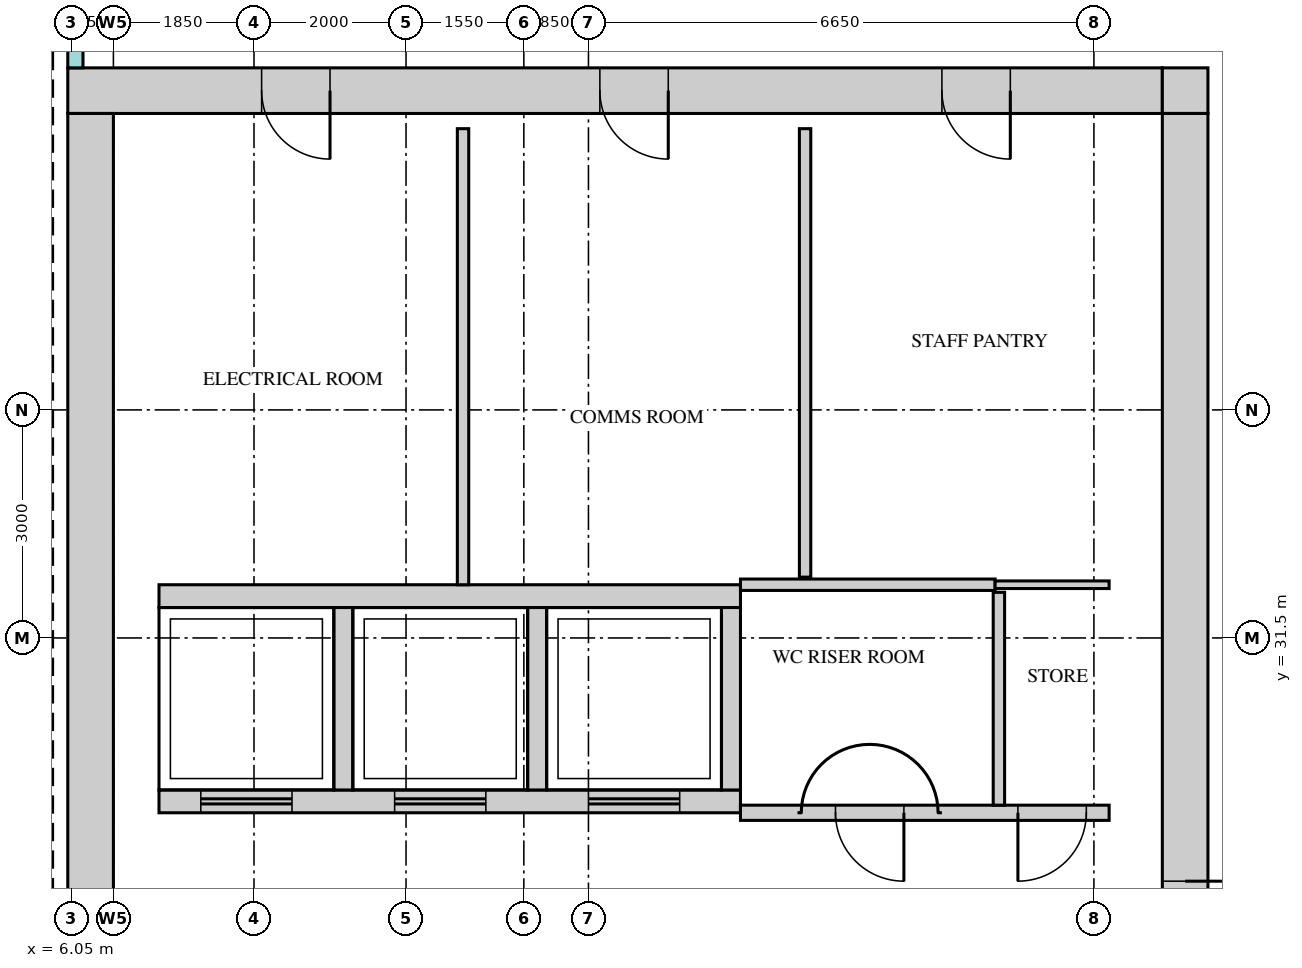
"""IFC4 building model, lengths in metres.
Left out: names, types, materials, properties, quantities, classifications, styles, units other than length and angle.
Written with IfcOpenShell. Run it as: python <this file> out.ifc"""

import sys

from ifc_helpers import new_model, si_unit, direction, frame, frame_2d, origin, place, context, subcontext, project, spatial, rectangle, extrude, source, transform, mapped, element, fill, save


model = new_model("IFC4")
c1 = context("Model", 3, precision=1e-05, world=origin(), true_north=direction((0.0, 1.0)))
c2 = subcontext(c1, "Body", "Model", "MODEL_VIEW")
j1 = project(units=[si_unit("LENGTHUNIT", "METRE"), si_unit("PLANEANGLEUNIT", "RADIAN")], contexts=[c1])
p1 = place(None, origin())
s1 = spatial("IfcSite", under=j1, at=p1, CompositionType="ELEMENT")
p2 = place(p1, origin())
s2 = spatial("IfcBuilding", under=s1, at=p2, CompositionType="ELEMENT")
p3 = place(p2, frame((0.0, 0.0, 290.2)))
s3 = spatial("IfcBuildingStorey", under=s2, at=p3, CompositionType="ELEMENT", Elevation=290.2)
m1 = source(origin(), c2, "Body", "SweptSolid", [
    extrude(rectangle(XDim=14.4, YDim=0.6, at=frame_2d((7.2, 0.0))), origin(), (0.0, 0.0, 1.0), 3.75),
])
p4 = place(p3, frame((6.0, 38.7, 0.0), z_axis=(0.0, 0.0, 1.0), x_axis=(1.0, 0.0, 0.0)))
e1 = element("IfcWall", 1, at=p4, inside=s3, PredefinedType="SHEAR", context=c2, shape_type="MappedRepresentation", body=[
    mapped(m1, transform((0.0, 0.0, 0.0))),
])
m2 = source(origin(), c2, "Body", "SweptSolid", [
    extrude(rectangle(XDim=0.9, YDim=2.1, at=frame_2d((0.45, 1.05))), frame((0.0, 0.31, 0.0), z_axis=(0.0, -1.0, 0.0), x_axis=(1.0, 0.0, 0.0)), (0.0, 0.0, 1.0), 0.62),
])
p5 = place(p4, frame((2.55, 0.0, 0.0)))
e2 = element("IfcOpeningElement", 2, at=p5, cuts=e1, PredefinedType="OPENING", context=c2, shape_type="MappedRepresentation", body=[
    mapped(m2, transform((0.0, 0.0, 0.0))),
])
p6 = place(p4, frame((7.0, 0.0, 0.0)))
e3 = element("IfcOpeningElement", 3, at=p6, cuts=e1, PredefinedType="OPENING", context=c2, shape_type="MappedRepresentation", body=[
    mapped(m2, transform((0.0, 0.0, 0.0))),
])
p7 = place(p4, frame((11.5, 0.0, 0.0)))
e4 = element("IfcOpeningElement", 4, at=p7, cuts=e1, PredefinedType="OPENING", context=c2, shape_type="MappedRepresentation", body=[
    mapped(m2, transform((0.0, 0.0, 0.0))),
])
m3 = source(origin(), c2, "Body", "SweptSolid", [
    extrude(rectangle(XDim=0.6, YDim=0.6, at=frame_2d((0.3, 0.0))), origin(), (0.0, 0.0, 1.0), 3.75),
])
p8 = place(p3, frame((20.4, 38.7, 0.0), z_axis=(0.0, 0.0, 1.0), x_axis=(1.0, 0.0, 0.0)))
e5 = element("IfcWall", 5, at=p8, inside=s3, PredefinedType="SHEAR", context=c2, shape_type="MappedRepresentation", body=[
    mapped(m3, transform((0.0, 0.0, 0.0))),
])
m4 = source(origin(), c2, "Body", "SweptSolid", [
    extrude(rectangle(XDim=22.8, YDim=0.6, at=frame_2d((11.4, 0.0))), origin(), (0.0, 0.0, 1.0), 3.75),
])
p9 = place(p3, frame((20.7, 15.6, 0.0), z_axis=(0.0, 0.0, 1.0), x_axis=(0.0, 1.0, 0.0)))
e6 = element("IfcWall", 6, at=p9, inside=s3, PredefinedType="SHEAR", context=c2, shape_type="MappedRepresentation", body=[
    mapped(m4, transform((0.0, 0.0, 0.0))),
])
m5 = source(origin(), c2, "Body", "SweptSolid", [
    extrude(rectangle(XDim=1.8, YDim=2.1, at=frame_2d((0.9, 1.05))), frame((0.0, 0.31, 0.0), z_axis=(0.0, -1.0, 0.0), x_axis=(1.0, 0.0, 0.0)), (0.0, 0.0, 1.0), 0.62),
])
p10 = place(p9, frame((10.9, 0.0, 0.0)))
e7 = element("IfcOpeningElement", 7, at=p10, cuts=e6, PredefinedType="OPENING", context=c2, shape_type="MappedRepresentation", body=[
    mapped(m5, transform((0.0, 0.0, 0.0))),
])
p11 = place(p9, frame((0.55, 0.0, 0.0)))
e8 = element("IfcOpeningElement", 8, at=p11, cuts=e6, PredefinedType="OPENING", context=c2, shape_type="MappedRepresentation", body=[
    mapped(m2, transform((0.0, 0.0, 0.0))),
])
m6 = source(origin(), c2, "Body", "SweptSolid", [
    extrude(rectangle(XDim=1.0, YDim=2.1, at=frame_2d((0.5, 1.05))), frame((0.0, 0.31, 0.0), z_axis=(0.0, -1.0, 0.0), x_axis=(1.0, 0.0, 0.0)), (0.0, 0.0, 1.0), 0.62),
])
p12 = place(p9, frame((2.3, 0.0, 0.0)))
e9 = element("IfcOpeningElement", 9, at=p12, cuts=e6, PredefinedType="OPENING", context=c2, shape_type="MappedRepresentation", body=[
    mapped(m6, transform((0.0, 0.0, 0.0))),
])
p13 = place(p9, frame((5.1, 0.0, 0.0)))
e10 = element("IfcOpeningElement", 10, at=p13, cuts=e6, PredefinedType="OPENING", context=c2, shape_type="MappedRepresentation", body=[
    mapped(m2, transform((0.0, 0.0, 0.0))),
])
p14 = place(p3, frame((6.3, 15.6, 0.0), z_axis=(0.0, 0.0, 1.0), x_axis=(0.0, 1.0, 0.0)))
e11 = element("IfcWall", 11, at=p14, inside=s3, PredefinedType="SHEAR", context=c2, shape_type="MappedRepresentation", body=[
    mapped(m4, transform((0.0, 0.0, 0.0))),
])
m7 = source(origin(), c2, "Body", "SweptSolid", [
    extrude(rectangle(XDim=7.65, YDim=0.3, at=frame_2d((3.825, 0.0))), origin(), (0.0, 0.0, 1.0), 3.75),
])
p15 = place(p3, frame((7.2, 32.05, 0.0), z_axis=(0.0, 0.0, 1.0), x_axis=(1.0, 0.0, 0.0)))
e12 = element("IfcWall", 12, at=p15, inside=s3, PredefinedType="STANDARD", context=c2, shape_type="MappedRepresentation", body=[
    mapped(m7, transform((0.0, 0.0, 0.0))),
])
p16 = place(p3, frame((7.2, 29.35, 0.0), z_axis=(0.0, 0.0, 1.0), x_axis=(1.0, 0.0, 0.0)))
e13 = element("IfcWall", 13, at=p16, inside=s3, PredefinedType="STANDARD", context=c2, shape_type="MappedRepresentation", body=[
    mapped(m7, transform((0.0, 0.0, 0.0))),
])
m8 = source(origin(), c2, "Body", "SweptSolid", [
    extrude(rectangle(XDim=1.2, YDim=2.1, at=frame_2d((0.6, 1.05))), frame((0.0, 0.16, 0.0), z_axis=(0.0, -1.0, 0.0), x_axis=(1.0, 0.0, 0.0)), (0.0, 0.0, 1.0), 0.32),
])
p17 = place(p16, frame((0.55, 0.0, 0.0)))
e14 = element("IfcOpeningElement", 14, at=p17, cuts=e13, PredefinedType="OPENING", context=c2, shape_type="MappedRepresentation", body=[
    mapped(m8, transform((0.0, 0.0, 0.0))),
])
p18 = place(p16, frame((3.1, 0.0, 0.0)))
e15 = element("IfcOpeningElement", 15, at=p18, cuts=e13, PredefinedType="OPENING", context=c2, shape_type="MappedRepresentation", body=[
    mapped(m8, transform((0.0, 0.0, 0.0))),
])
p19 = place(p16, frame((5.65, 0.0, 0.0)))
e16 = element("IfcOpeningElement", 16, at=p19, cuts=e13, PredefinedType="OPENING", context=c2, shape_type="MappedRepresentation", body=[
    mapped(m8, transform((0.0, 0.0, 0.0))),
])
m9 = source(origin(), c2, "Body", "SweptSolid", [
    extrude(rectangle(XDim=2.4, YDim=0.25, at=frame_2d((1.2, 0.0))), origin(), (0.0, 0.0, 1.0), 3.75),
])
for number, where, z_axis, x_axis in (
    (17, (9.625, 29.5, 0.0), (0.0, 0.0, 1.0), (0.0, 1.0, 0.0)),
    (18, (12.175, 29.5, 0.0), (0.0, 0.0, 1.0), (0.0, 1.0, 0.0)),
    (19, (14.725, 29.5, 0.0), (0.0, 0.0, 1.0), (0.0, 1.0, 0.0)),
):
    element("IfcWall", number, at=place(p3, frame(where, z_axis=z_axis, x_axis=x_axis)), inside=s3, PredefinedType="STANDARD", context=c2, shape_type="MappedRepresentation", body=[
        mapped(m9, transform((0.0, 0.0, 0.0))),
    ])
m10 = source(origin(), c2, "Body", "SweptSolid", [
    extrude(rectangle(XDim=4.85, YDim=0.2, at=frame_2d((2.425, 0.0))), origin(), (0.0, 0.0, 1.0), 3.8),
])
p20 = place(p3, frame((14.85, 29.2, 0.0), z_axis=(0.0, 0.0, 1.0), x_axis=(1.0, 0.0, 0.0)))
e20 = element("IfcWall", 20, at=p20, inside=s3, PredefinedType="PARTITIONING", context=c2, shape_type="MappedRepresentation", body=[
    mapped(m10, transform((0.0, 0.0, 0.0))),
])
m11 = source(origin(), c2, "Body", "SweptSolid", [
    extrude(rectangle(XDim=0.9, YDim=2.1, at=frame_2d((0.45, 1.05))), frame((0.0, 0.11, 0.0), z_axis=(0.0, -1.0, 0.0), x_axis=(1.0, 0.0, 0.0)), (0.0, 0.0, 1.0), 0.22),
])
p21 = place(p20, frame((1.25, 0.0, 0.0)))
e21 = element("IfcOpeningElement", 21, at=p21, cuts=e20, PredefinedType="OPENING", context=c2, shape_type="MappedRepresentation", body=[
    mapped(m11, transform((0.0, 0.0, 0.0))),
])
p22 = place(p20, frame((3.65, 0.0, 0.0)))
e22 = element("IfcOpeningElement", 22, at=p22, cuts=e20, PredefinedType="OPENING", context=c2, shape_type="MappedRepresentation", body=[
    mapped(m11, transform((0.0, 0.0, 0.0))),
])
m12 = source(origin(), c2, "Body", "SweptSolid", [
    extrude(rectangle(XDim=2.8, YDim=0.15, at=frame_2d((1.4, 0.0))), origin(), (0.0, 0.0, 1.0), 3.8),
])
p23 = place(p3, frame((18.25, 29.3, 0.0), z_axis=(0.0, 0.0, 1.0), x_axis=(0.0, 1.0, 0.0)))
e23 = element("IfcWall", 23, at=p23, inside=s3, PredefinedType="PARTITIONING", context=c2, shape_type="MappedRepresentation", body=[
    mapped(m12, transform((0.0, 0.0, 0.0))),
])
m13 = source(origin(), c2, "Body", "SweptSolid", [
    extrude(rectangle(XDim=6.0, YDim=0.15, at=frame_2d((3.0, 0.0))), origin(), (0.0, 0.0, 1.0), 3.8),
])
p24 = place(p3, frame((11.2, 32.2, 0.0), z_axis=(0.0, 0.0, 1.0), x_axis=(0.0, 1.0, 0.0)))
e24 = element("IfcWall", 24, at=p24, inside=s3, PredefinedType="PARTITIONING", context=c2, shape_type="MappedRepresentation", body=[
    mapped(m13, transform((0.0, 0.0, 0.0))),
])
m14 = source(origin(), c2, "Body", "SweptSolid", [
    extrude(rectangle(XDim=3.35, YDim=0.15, at=frame_2d((1.675, 0.0))), origin(), (0.0, 0.0, 1.0), 3.8),
])
p25 = place(p3, frame((14.85, 32.2, 0.0), z_axis=(0.0, 0.0, 1.0), x_axis=(1.0, 0.0, 0.0)))
e25 = element("IfcWall", 25, at=p25, inside=s3, PredefinedType="PARTITIONING", context=c2, shape_type="MappedRepresentation", body=[
    mapped(m14, transform((0.0, 0.0, 0.0))),
])
m15 = source(origin(), c2, "Body", "SweptSolid", [
    extrude(rectangle(XDim=1.5, YDim=0.1, at=frame_2d((0.75, 0.0))), origin(), (0.0, 0.0, 1.0), 3.8),
])
p26 = place(p3, frame((18.2, 32.2, 0.0), z_axis=(0.0, 0.0, 1.0), x_axis=(1.0, 0.0, 0.0)))
e26 = element("IfcWall", 26, at=p26, inside=s3, PredefinedType="PARTITIONING", context=c2, shape_type="MappedRepresentation", body=[
    mapped(m15, transform((0.0, 0.0, 0.0))),
])
m16 = source(origin(), c2, "Body", "SweptSolid", [
    extrude(rectangle(XDim=5.9, YDim=0.15, at=frame_2d((2.95, 0.0))), origin(), (0.0, 0.0, 1.0), 3.8),
])
p27 = place(p3, frame((15.7, 32.3, 0.0), z_axis=(0.0, 0.0, 1.0), x_axis=(0.0, 1.0, 0.0)))
e27 = element("IfcWall", 27, at=p27, inside=s3, PredefinedType="PARTITIONING", context=c2, shape_type="MappedRepresentation", body=[
    mapped(m16, transform((0.0, 0.0, 0.0))),
])
m17 = source(origin(), c2, "Body", "SweptSolid", [
    extrude(rectangle(XDim=0.9, YDim=2.1, at=frame_2d((0.45, 1.05))), frame((0.0, 0.025, 0.0), z_axis=(0.0, -1.0, 0.0), x_axis=(1.0, 0.0, 0.0)), (0.0, 0.0, 1.0), 0.05),
])
p28 = place(p21, origin())
e28 = element("IfcDoor", 28, at=p28, inside=s3, OperationType="SINGLE_SWING_RIGHT", PredefinedType="DOOR", context=c2, shape_type="MappedRepresentation", body=[
    mapped(m17, transform((0.0, 0.0, 0.0))),
])
fill(e21, e28)
p29 = place(p22, origin())
e29 = element("IfcDoor", 29, at=p29, inside=s3, OperationType="SINGLE_SWING_LEFT", PredefinedType="DOOR", context=c2, shape_type="MappedRepresentation", body=[
    mapped(m17, transform((0.0, 0.0, 0.0))),
])
fill(e22, e29)
m18 = source(origin(), c2, "Body", "SweptSolid", [
    extrude(rectangle(XDim=1.8, YDim=2.1, at=frame_2d((0.9, 1.05))), frame((0.0, 0.25, 0.0), z_axis=(0.0, -1.0, 0.0), x_axis=(1.0, 0.0, 0.0)), (0.0, 0.0, 1.0), 0.5),
])
p30 = place(p10, origin())
e30 = element("IfcDoor", 30, at=p30, inside=s3, OperationType="DOUBLE_DOOR_SINGLE_SWING", PredefinedType="DOOR", context=c2, shape_type="MappedRepresentation", body=[
    mapped(m18, transform((0.0, 0.0, 0.0))),
])
fill(e7, e30)
m19 = source(origin(), c2, "Body", "SweptSolid", [
    extrude(rectangle(XDim=0.9, YDim=2.1, at=frame_2d((0.45, 1.05))), frame((0.0, 0.25, 0.0), z_axis=(0.0, -1.0, 0.0), x_axis=(1.0, 0.0, 0.0)), (0.0, 0.0, 1.0), 0.5),
])
p31 = place(p5, origin())
e31 = element("IfcDoor", 31, at=p31, inside=s3, OperationType="SINGLE_SWING_RIGHT", PredefinedType="DOOR", context=c2, shape_type="MappedRepresentation", body=[
    mapped(m19, transform((0.0, 0.0, 0.0))),
])
fill(e2, e31)
p32 = place(p6, origin())
e32 = element("IfcDoor", 32, at=p32, inside=s3, OperationType="SINGLE_SWING_RIGHT", PredefinedType="DOOR", context=c2, shape_type="MappedRepresentation", body=[
    mapped(m19, transform((0.0, 0.0, 0.0))),
])
fill(e3, e32)
p33 = place(p7, origin())
e33 = element("IfcDoor", 33, at=p33, inside=s3, OperationType="SINGLE_SWING_RIGHT", PredefinedType="DOOR", context=c2, shape_type="MappedRepresentation", body=[
    mapped(m19, transform((0.0, 0.0, 0.0))),
])
fill(e4, e33)
m20 = source(origin(), c2, "Body", "SweptSolid", [
    extrude(rectangle(XDim=1.2, YDim=2.1, at=frame_2d((0.6, 1.05))), frame((0.0, 0.025, 0.0), z_axis=(0.0, -1.0, 0.0), x_axis=(1.0, 0.0, 0.0)), (0.0, 0.0, 1.0), 0.05),
])
p34 = place(p17, origin())
e34 = element("IfcDoor", 34, at=p34, inside=s3, OperationType="DOUBLE_DOOR_SLIDING", PredefinedType="DOOR", context=c2, shape_type="MappedRepresentation", body=[
    mapped(m20, transform((0.0, 0.0, 0.0))),
])
fill(e14, e34)
p35 = place(p18, origin())
e35 = element("IfcDoor", 35, at=p35, inside=s3, OperationType="DOUBLE_DOOR_SLIDING", PredefinedType="DOOR", context=c2, shape_type="MappedRepresentation", body=[
    mapped(m20, transform((0.0, 0.0, 0.0))),
])
fill(e15, e35)
p36 = place(p19, origin())
e36 = element("IfcDoor", 36, at=p36, inside=s3, OperationType="DOUBLE_DOOR_SLIDING", PredefinedType="DOOR", context=c2, shape_type="MappedRepresentation", body=[
    mapped(m20, transform((0.0, 0.0, 0.0))),
])
fill(e16, e36)
save(model, sys.argv[1])
